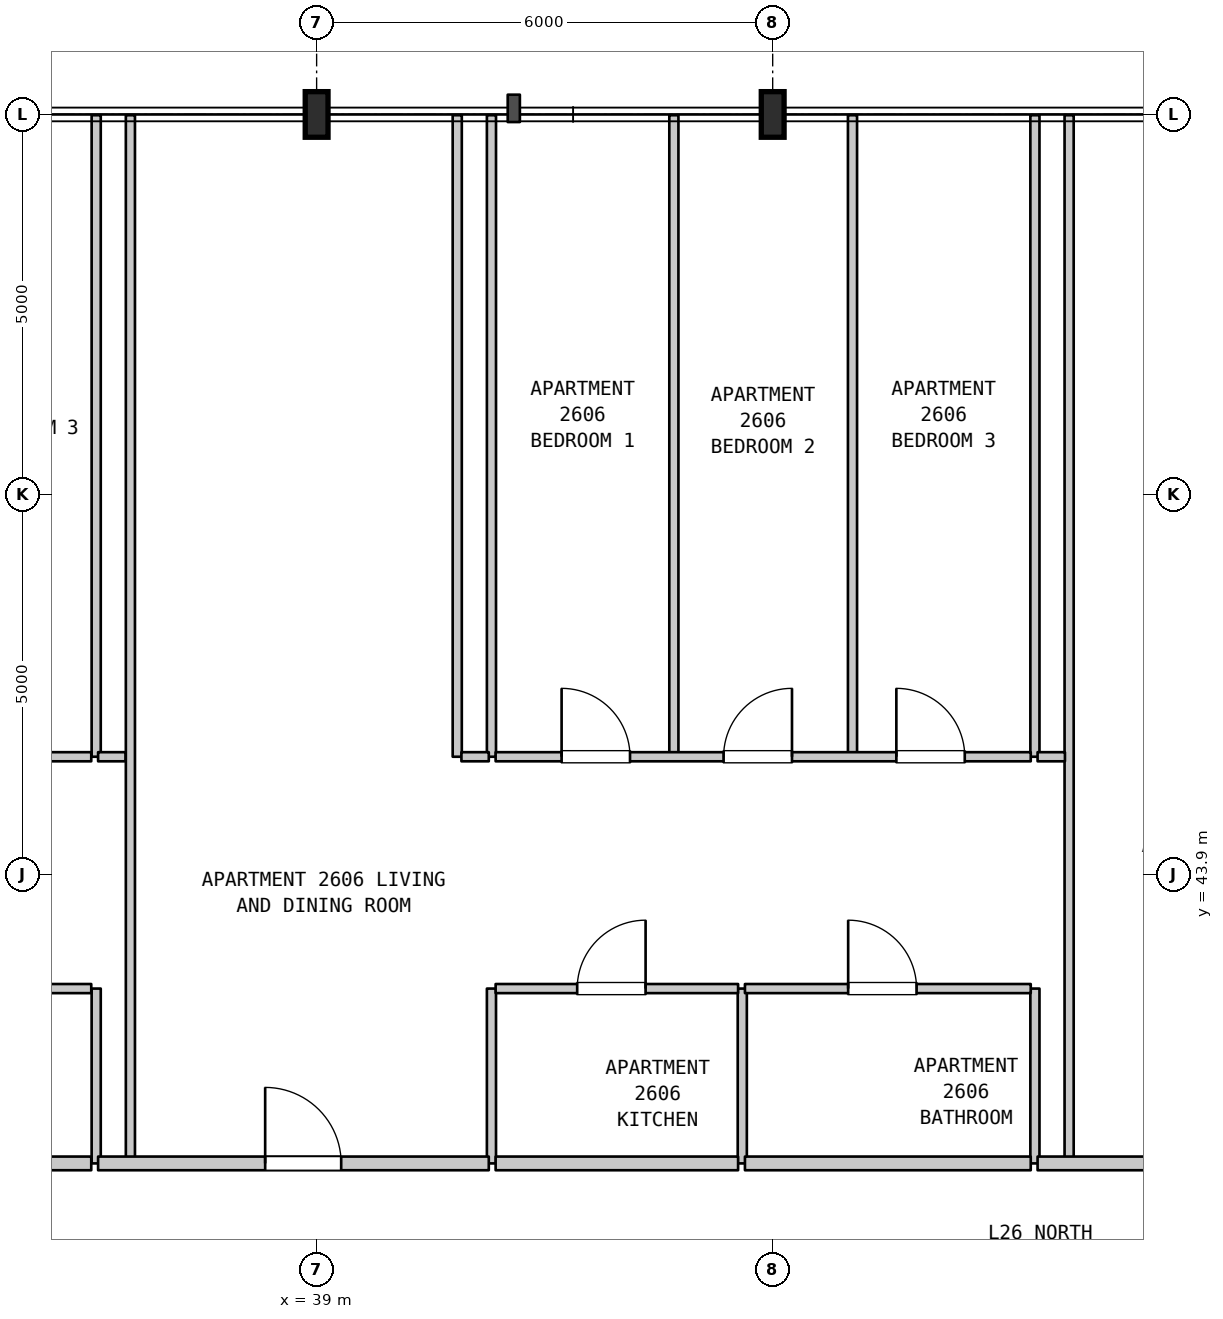
"""IFC4 building model, lengths in metres.
Left out: names, types, materials, properties, quantities, classifications, styles, units other than length and angle.
Written with IfcOpenShell. Run it as: python <this file> out.ifc"""

import sys

from ifc_helpers import new_model, si_unit, direction, frame, frame_2d, origin, origin_2d, place, context, subcontext, project, spatial, rectangle, i_section, extrude, element, fill, save


model = new_model("IFC4")
c1 = context("Model", 3, precision=1e-05, world=origin(), true_north=direction((0.0, 1.0)))
c2 = subcontext(c1, "Body", "Model", "MODEL_VIEW")
j1 = project(units=[si_unit("LENGTHUNIT", "METRE"), si_unit("PLANEANGLEUNIT", "RADIAN")], contexts=[c1])
p1 = place(None, origin())
s1 = spatial("IfcSite", under=j1, at=p1, CompositionType="ELEMENT")
p2 = place(p1, origin())
s2 = spatial("IfcBuilding", under=s1, at=p2, CompositionType="ELEMENT")
p3 = place(p2, frame((0.0, 0.0, 109.4)))
s3 = spatial("IfcBuildingStorey", under=s2, at=p3, CompositionType="ELEMENT", Elevation=109.4)
for number, where, z_axis, x_axis in (
    (1, (39.0, 53.9, 0.0), (0.0, 0.0, 1.0), (1.0, 0.0, 0.0)),
    (2, (45.0, 53.9, 0.0), (0.0, 0.0, 1.0), (1.0, 0.0, 0.0)),
):
    element("IfcColumn", number, at=place(p3, frame(where, z_axis=z_axis, x_axis=x_axis)), inside=s3, PredefinedType="COLUMN", context=c2, shape_type="SweptSolid", body=[
        extrude(i_section(OverallWidth=0.3, OverallDepth=0.6, WebThickness=0.015, FlangeThickness=0.03, FilletRadius=0.027, at=origin_2d()), origin(), (0.0, 0.0, 1.0), 3.7),
    ])
p4 = place(p3, frame((36.1, 40.1, 0.0), z_axis=(0.0, 0.0, 1.0), x_axis=(0.0, 1.0, 0.0)))
e3 = element("IfcWall", 3, at=p4, inside=s3, PredefinedType="PARTITIONING", context=c2, shape_type="SweptSolid", body=[
    extrude(rectangle(XDim=2.3, YDim=0.12, at=frame_2d((1.15, 0.0))), origin(), (0.0, 0.0, 1.0), 3.385),
])
p5 = place(p3, frame((36.1, 45.45, 0.0), z_axis=(0.0, 0.0, 1.0), x_axis=(0.0, 1.0, 0.0)))
e4 = element("IfcWall", 4, at=p5, inside=s3, PredefinedType="PARTITIONING", context=c2, shape_type="SweptSolid", body=[
    extrude(rectangle(XDim=8.44, YDim=0.12, at=frame_2d((4.22, 0.0))), origin(), (0.0, 0.0, 1.0), 3.385),
])
p6 = place(p3, frame((36.55, 40.1, 0.0), z_axis=(0.0, 0.0, 1.0), x_axis=(0.0, 1.0, 0.0)))
e5 = element("IfcWall", 5, at=p6, inside=s3, PredefinedType="PARTITIONING", context=c2, shape_type="SweptSolid", body=[
    extrude(rectangle(XDim=13.79, YDim=0.12, at=frame_2d((6.895, 0.0))), origin(), (0.0, 0.0, 1.0), 3.385),
])
p7 = place(p3, frame((40.85, 45.45, 0.0), z_axis=(0.0, 0.0, 1.0), x_axis=(0.0, 1.0, 0.0)))
e6 = element("IfcWall", 6, at=p7, inside=s3, PredefinedType="PARTITIONING", context=c2, shape_type="SweptSolid", body=[
    extrude(rectangle(XDim=8.44, YDim=0.12, at=frame_2d((4.22, 0.0))), origin(), (0.0, 0.0, 1.0), 3.385),
])
p8 = place(p3, frame((41.3, 40.1, 0.0), z_axis=(0.0, 0.0, 1.0), x_axis=(0.0, 1.0, 0.0)))
e7 = element("IfcWall", 7, at=p8, inside=s3, PredefinedType="PARTITIONING", context=c2, shape_type="SweptSolid", body=[
    extrude(rectangle(XDim=2.3, YDim=0.12, at=frame_2d((1.15, 0.0))), origin(), (0.0, 0.0, 1.0), 3.385),
])
for number, where, z_axis, x_axis in (
    (8, (41.3, 45.45, 0.0), (0.0, 0.0, 1.0), (0.0, 1.0, 0.0)),
    (9, (43.7, 45.45, 0.0), (0.0, 0.0, 1.0), (0.0, 1.0, 0.0)),
):
    element("IfcWall", number, at=place(p3, frame(where, z_axis=z_axis, x_axis=x_axis)), inside=s3, PredefinedType="PARTITIONING", context=c2, shape_type="SweptSolid", body=[
        extrude(rectangle(XDim=8.44, YDim=0.12, at=frame_2d((4.22, 0.0))), origin(), (0.0, 0.0, 1.0), 3.385),
    ])
p9 = place(p3, frame((44.6, 40.1, 0.0), z_axis=(0.0, 0.0, 1.0), x_axis=(0.0, 1.0, 0.0)))
e10 = element("IfcWall", 10, at=p9, inside=s3, PredefinedType="PARTITIONING", context=c2, shape_type="SweptSolid", body=[
    extrude(rectangle(XDim=2.3, YDim=0.12, at=frame_2d((1.15, 0.0))), origin(), (0.0, 0.0, 1.0), 3.385),
])
p10 = place(p3, frame((46.05, 45.45, 0.0), z_axis=(0.0, 0.0, 1.0), x_axis=(0.0, 1.0, 0.0)))
e11 = element("IfcWall", 11, at=p10, inside=s3, PredefinedType="PARTITIONING", context=c2, shape_type="SweptSolid", body=[
    extrude(rectangle(XDim=8.44, YDim=0.12, at=frame_2d((4.22, 0.0))), origin(), (0.0, 0.0, 1.0), 3.385),
])
p11 = place(p3, frame((48.45, 40.1, 0.0), z_axis=(0.0, 0.0, 1.0), x_axis=(0.0, 1.0, 0.0)))
e12 = element("IfcWall", 12, at=p11, inside=s3, PredefinedType="PARTITIONING", context=c2, shape_type="SweptSolid", body=[
    extrude(rectangle(XDim=2.3, YDim=0.12, at=frame_2d((1.15, 0.0))), origin(), (0.0, 0.0, 1.0), 3.385),
])
p12 = place(p3, frame((48.45, 45.45, 0.0), z_axis=(0.0, 0.0, 1.0), x_axis=(0.0, 1.0, 0.0)))
e13 = element("IfcWall", 13, at=p12, inside=s3, PredefinedType="PARTITIONING", context=c2, shape_type="SweptSolid", body=[
    extrude(rectangle(XDim=8.44, YDim=0.12, at=frame_2d((4.22, 0.0))), origin(), (0.0, 0.0, 1.0), 3.385),
])
p13 = place(p3, frame((48.9, 40.1, 0.0), z_axis=(0.0, 0.0, 1.0), x_axis=(0.0, 1.0, 0.0)))
e14 = element("IfcWall", 14, at=p13, inside=s3, PredefinedType="PARTITIONING", context=c2, shape_type="SweptSolid", body=[
    extrude(rectangle(XDim=13.79, YDim=0.12, at=frame_2d((6.895, 0.0))), origin(), (0.0, 0.0, 1.0), 3.385),
])
p14 = place(p3, frame((31.913, 40.1, 0.0), z_axis=(0.0, 0.0, 1.0), x_axis=(1.0, 0.0, 0.0)))
e15 = element("IfcWall", 15, at=p14, inside=s3, PredefinedType="STANDARD", context=c2, shape_type="SweptSolid", body=[
    extrude(rectangle(XDim=4.122, YDim=0.18, at=frame_2d((2.061, 0.0))), origin(), (0.0, 0.0, 1.0), 3.385),
])
p15 = place(p3, frame((36.125, 40.1, 0.0), z_axis=(0.0, 0.0, 1.0), x_axis=(1.0, 0.0, 0.0)))
e16 = element("IfcWall", 16, at=p15, inside=s3, PredefinedType="STANDARD", context=c2, shape_type="SweptSolid", body=[
    extrude(rectangle(XDim=5.14, YDim=0.18, at=frame_2d((2.57, 0.0))), origin(), (0.0, 0.0, 1.0), 3.385),
])
p16 = place(p15, frame((2.198, 0.0, 0.0)))
e17 = element("IfcOpeningElement", 17, at=p16, cuts=e16, PredefinedType="OPENING", context=c2, shape_type="SweptSolid", body=[
    extrude(rectangle(XDim=1.0, YDim=2.15, at=frame_2d((0.5, 1.075))), frame((0.0, 0.1, 0.0), z_axis=(0.0, -1.0, 0.0), x_axis=(1.0, 0.0, 0.0)), (0.0, 0.0, 1.0), 0.2),
])
p17 = place(p3, frame((41.355, 40.1, 0.0), z_axis=(0.0, 0.0, 1.0), x_axis=(1.0, 0.0, 0.0)))
e18 = element("IfcWall", 18, at=p17, inside=s3, PredefinedType="STANDARD", context=c2, shape_type="SweptSolid", body=[
    extrude(rectangle(XDim=3.19, YDim=0.18, at=frame_2d((1.595, 0.0))), origin(), (0.0, 0.0, 1.0), 3.385),
])
p18 = place(p3, frame((44.635, 40.1, 0.0), z_axis=(0.0, 0.0, 1.0), x_axis=(1.0, 0.0, 0.0)))
e19 = element("IfcWall", 19, at=p18, inside=s3, PredefinedType="STANDARD", context=c2, shape_type="SweptSolid", body=[
    extrude(rectangle(XDim=3.76, YDim=0.18, at=frame_2d((1.88, 0.0))), origin(), (0.0, 0.0, 1.0), 3.385),
])
p19 = place(p3, frame((48.485, 40.1, 0.0), z_axis=(0.0, 0.0, 1.0), x_axis=(1.0, 0.0, 0.0)))
e20 = element("IfcWall", 20, at=p19, inside=s3, PredefinedType="STANDARD", context=c2, shape_type="SweptSolid", body=[
    extrude(rectangle(XDim=5.1, YDim=0.18, at=frame_2d((2.55, 0.0))), origin(), (0.0, 0.0, 1.0), 3.385),
])
p20 = place(p19, frame((2.179, 0.0, 0.0)))
e21 = element("IfcOpeningElement", 21, at=p20, cuts=e20, PredefinedType="OPENING", context=c2, shape_type="SweptSolid", body=[
    extrude(rectangle(XDim=1.0, YDim=2.15, at=frame_2d((0.5, 1.075))), frame((0.0, 0.1, 0.0), z_axis=(0.0, -1.0, 0.0), x_axis=(1.0, 0.0, 0.0)), (0.0, 0.0, 1.0), 0.2),
])
p21 = place(p3, frame((31.913, 42.4, 0.0), z_axis=(0.0, 0.0, 1.0), x_axis=(1.0, 0.0, 0.0)))
e22 = element("IfcWall", 22, at=p21, inside=s3, PredefinedType="PARTITIONING", context=c2, shape_type="SweptSolid", body=[
    extrude(rectangle(XDim=4.122, YDim=0.12, at=frame_2d((2.061, 0.0))), origin(), (0.0, 0.0, 1.0), 3.385),
])
p22 = place(p21, frame((1.611, 0.0, 0.0)))
e23 = element("IfcOpeningElement", 23, at=p22, cuts=e22, PredefinedType="OPENING", context=c2, shape_type="SweptSolid", body=[
    extrude(rectangle(XDim=0.9, YDim=2.1, at=frame_2d((0.45, 1.05))), frame((0.0, 0.07, 0.0), z_axis=(0.0, -1.0, 0.0), x_axis=(1.0, 0.0, 0.0)), (0.0, 0.0, 1.0), 0.14),
])
p23 = place(p3, frame((41.355, 42.4, 0.0), z_axis=(0.0, 0.0, 1.0), x_axis=(1.0, 0.0, 0.0)))
e24 = element("IfcWall", 24, at=p23, inside=s3, PredefinedType="PARTITIONING", context=c2, shape_type="SweptSolid", body=[
    extrude(rectangle(XDim=3.19, YDim=0.12, at=frame_2d((1.595, 0.0))), origin(), (0.0, 0.0, 1.0), 3.385),
])
p24 = place(p23, frame((1.073, 0.0, 0.0)))
e25 = element("IfcOpeningElement", 25, at=p24, cuts=e24, PredefinedType="OPENING", context=c2, shape_type="SweptSolid", body=[
    extrude(rectangle(XDim=0.9, YDim=2.15, at=frame_2d((0.45, 1.075))), frame((0.0, 0.07, 0.0), z_axis=(0.0, -1.0, 0.0), x_axis=(1.0, 0.0, 0.0)), (0.0, 0.0, 1.0), 0.14),
])
p25 = place(p3, frame((44.635, 42.4, 0.0), z_axis=(0.0, 0.0, 1.0), x_axis=(1.0, 0.0, 0.0)))
e26 = element("IfcWall", 26, at=p25, inside=s3, PredefinedType="PARTITIONING", context=c2, shape_type="SweptSolid", body=[
    extrude(rectangle(XDim=3.76, YDim=0.12, at=frame_2d((1.88, 0.0))), origin(), (0.0, 0.0, 1.0), 3.385),
])
p26 = place(p25, frame((1.358, 0.0, 0.0)))
e27 = element("IfcOpeningElement", 27, at=p26, cuts=e26, PredefinedType="OPENING", context=c2, shape_type="SweptSolid", body=[
    extrude(rectangle(XDim=0.9, YDim=2.1, at=frame_2d((0.45, 1.05))), frame((0.0, 0.07, 0.0), z_axis=(0.0, -1.0, 0.0), x_axis=(1.0, 0.0, 0.0)), (0.0, 0.0, 1.0), 0.14),
])
p27 = place(p3, frame((28.325, 45.45, 0.0), z_axis=(0.0, 0.0, 1.0), x_axis=(1.0, 0.0, 0.0)))
e28 = element("IfcWall", 28, at=p27, inside=s3, PredefinedType="PARTITIONING", context=c2, shape_type="SweptSolid", body=[
    extrude(rectangle(XDim=7.71, YDim=0.12, at=frame_2d((3.855, 0.0))), origin(), (0.0, 0.0, 1.0), 3.385),
])
p28 = place(p27, frame((0.98, 0.0, 0.0)))
e29 = element("IfcOpeningElement", 29, at=p28, cuts=e28, PredefinedType="OPENING", context=c2, shape_type="SweptSolid", body=[
    extrude(rectangle(XDim=0.9, YDim=2.15, at=frame_2d((0.45, 1.075))), frame((0.0, 0.07, 0.0), z_axis=(0.0, -1.0, 0.0), x_axis=(1.0, 0.0, 0.0)), (0.0, 0.0, 1.0), 0.14),
])
p29 = place(p27, frame((3.405, 0.0, 0.0)))
e30 = element("IfcOpeningElement", 30, at=p29, cuts=e28, PredefinedType="OPENING", context=c2, shape_type="SweptSolid", body=[
    extrude(rectangle(XDim=0.9, YDim=2.15, at=frame_2d((0.45, 1.075))), frame((0.0, 0.07, 0.0), z_axis=(0.0, -1.0, 0.0), x_axis=(1.0, 0.0, 0.0)), (0.0, 0.0, 1.0), 0.14),
])
p30 = place(p27, frame((5.83, 0.0, 0.0)))
e31 = element("IfcOpeningElement", 31, at=p30, cuts=e28, PredefinedType="OPENING", context=c2, shape_type="SweptSolid", body=[
    extrude(rectangle(XDim=0.9, YDim=2.15, at=frame_2d((0.45, 1.075))), frame((0.0, 0.07, 0.0), z_axis=(0.0, -1.0, 0.0), x_axis=(1.0, 0.0, 0.0)), (0.0, 0.0, 1.0), 0.14),
])
p31 = place(p3, frame((36.125, 45.45, 0.0), z_axis=(0.0, 0.0, 1.0), x_axis=(1.0, 0.0, 0.0)))
e32 = element("IfcWall", 32, at=p31, inside=s3, PredefinedType="PARTITIONING", context=c2, shape_type="SweptSolid", body=[
    extrude(rectangle(XDim=0.36, YDim=0.12, at=frame_2d((0.18, 0.0))), origin(), (0.0, 0.0, 1.0), 3.385),
])
p32 = place(p3, frame((40.905, 45.45, 0.0), z_axis=(0.0, 0.0, 1.0), x_axis=(1.0, 0.0, 0.0)))
e33 = element("IfcWall", 33, at=p32, inside=s3, PredefinedType="PARTITIONING", context=c2, shape_type="SweptSolid", body=[
    extrude(rectangle(XDim=0.36, YDim=0.12, at=frame_2d((0.18, 0.0))), origin(), (0.0, 0.0, 1.0), 3.385),
])
p33 = place(p3, frame((41.355, 45.45, 0.0), z_axis=(0.0, 0.0, 1.0), x_axis=(1.0, 0.0, 0.0)))
e34 = element("IfcWall", 34, at=p33, inside=s3, PredefinedType="PARTITIONING", context=c2, shape_type="SweptSolid", body=[
    extrude(rectangle(XDim=7.04, YDim=0.12, at=frame_2d((3.52, 0.0))), origin(), (0.0, 0.0, 1.0), 3.385),
])
p34 = place(p33, frame((0.868, 0.0, 0.0)))
e35 = element("IfcOpeningElement", 35, at=p34, cuts=e34, PredefinedType="OPENING", context=c2, shape_type="SweptSolid", body=[
    extrude(rectangle(XDim=0.9, YDim=2.15, at=frame_2d((0.45, 1.075))), frame((0.0, 0.07, 0.0), z_axis=(0.0, -1.0, 0.0), x_axis=(1.0, 0.0, 0.0)), (0.0, 0.0, 1.0), 0.14),
])
p35 = place(p33, frame((2.999, 0.0, 0.0)))
e36 = element("IfcOpeningElement", 36, at=p35, cuts=e34, PredefinedType="OPENING", context=c2, shape_type="SweptSolid", body=[
    extrude(rectangle(XDim=0.9, YDim=2.15, at=frame_2d((0.45, 1.075))), frame((0.0, 0.07, 0.0), z_axis=(0.0, -1.0, 0.0), x_axis=(1.0, 0.0, 0.0)), (0.0, 0.0, 1.0), 0.14),
])
p36 = place(p33, frame((5.272, 0.0, 0.0)))
e37 = element("IfcOpeningElement", 37, at=p36, cuts=e34, PredefinedType="OPENING", context=c2, shape_type="SweptSolid", body=[
    extrude(rectangle(XDim=0.9, YDim=2.15, at=frame_2d((0.45, 1.075))), frame((0.0, 0.07, 0.0), z_axis=(0.0, -1.0, 0.0), x_axis=(1.0, 0.0, 0.0)), (0.0, 0.0, 1.0), 0.14),
])
p37 = place(p3, frame((48.485, 45.45, 0.0), z_axis=(0.0, 0.0, 1.0), x_axis=(1.0, 0.0, 0.0)))
e38 = element("IfcWall", 38, at=p37, inside=s3, PredefinedType="PARTITIONING", context=c2, shape_type="SweptSolid", body=[
    extrude(rectangle(XDim=0.36, YDim=0.12, at=frame_2d((0.18, 0.0))), origin(), (0.0, 0.0, 1.0), 3.385),
])
p38 = place(p16, origin())
e39 = element("IfcDoor", 39, at=p38, inside=s3, OperationType="SINGLE_SWING_LEFT", PredefinedType="DOOR", context=c2, shape_type="SweptSolid", body=[
    extrude(rectangle(XDim=1.0, YDim=2.15, at=frame_2d((0.5, 1.075))), frame((0.0, 0.025, 0.0), z_axis=(0.0, -1.0, 0.0), x_axis=(1.0, 0.0, 0.0)), (0.0, 0.0, 1.0), 0.05),
])
fill(e17, e39)
p39 = place(p24, origin())
e40 = element("IfcDoor", 40, at=p39, inside=s3, OperationType="SINGLE_SWING_RIGHT", PredefinedType="DOOR", context=c2, shape_type="SweptSolid", body=[
    extrude(rectangle(XDim=0.9, YDim=2.15, at=frame_2d((0.45, 1.075))), frame((0.0, 0.025, 0.0), z_axis=(0.0, -1.0, 0.0), x_axis=(1.0, 0.0, 0.0)), (0.0, 0.0, 1.0), 0.05),
])
fill(e25, e40)
p40 = place(p26, origin())
e41 = element("IfcDoor", 41, at=p40, inside=s3, OperationType="SINGLE_SWING_LEFT", PredefinedType="DOOR", context=c2, shape_type="SweptSolid", body=[
    extrude(rectangle(XDim=0.9, YDim=2.1, at=frame_2d((0.45, 1.05))), frame((0.0, 0.025, 0.0), z_axis=(0.0, -1.0, 0.0), x_axis=(1.0, 0.0, 0.0)), (0.0, 0.0, 1.0), 0.05),
])
fill(e27, e41)
p41 = place(p34, origin())
e42 = element("IfcDoor", 42, at=p41, inside=s3, OperationType="SINGLE_SWING_LEFT", PredefinedType="DOOR", context=c2, shape_type="SweptSolid", body=[
    extrude(rectangle(XDim=0.9, YDim=2.15, at=frame_2d((0.45, 1.075))), frame((0.0, 0.025, 0.0), z_axis=(0.0, -1.0, 0.0), x_axis=(1.0, 0.0, 0.0)), (0.0, 0.0, 1.0), 0.05),
])
fill(e35, e42)
p42 = place(p35, origin())
e43 = element("IfcDoor", 43, at=p42, inside=s3, OperationType="SINGLE_SWING_RIGHT", PredefinedType="DOOR", context=c2, shape_type="SweptSolid", body=[
    extrude(rectangle(XDim=0.9, YDim=2.15, at=frame_2d((0.45, 1.075))), frame((0.0, 0.025, 0.0), z_axis=(0.0, -1.0, 0.0), x_axis=(1.0, 0.0, 0.0)), (0.0, 0.0, 1.0), 0.05),
])
fill(e36, e43)
p43 = place(p36, origin())
e44 = element("IfcDoor", 44, at=p43, inside=s3, OperationType="SINGLE_SWING_LEFT", PredefinedType="DOOR", context=c2, shape_type="SweptSolid", body=[
    extrude(rectangle(XDim=0.9, YDim=2.15, at=frame_2d((0.45, 1.075))), frame((0.0, 0.025, 0.0), z_axis=(0.0, -1.0, 0.0), x_axis=(1.0, 0.0, 0.0)), (0.0, 0.0, 1.0), 0.05),
])
fill(e37, e44)
save(model, sys.argv[1])
